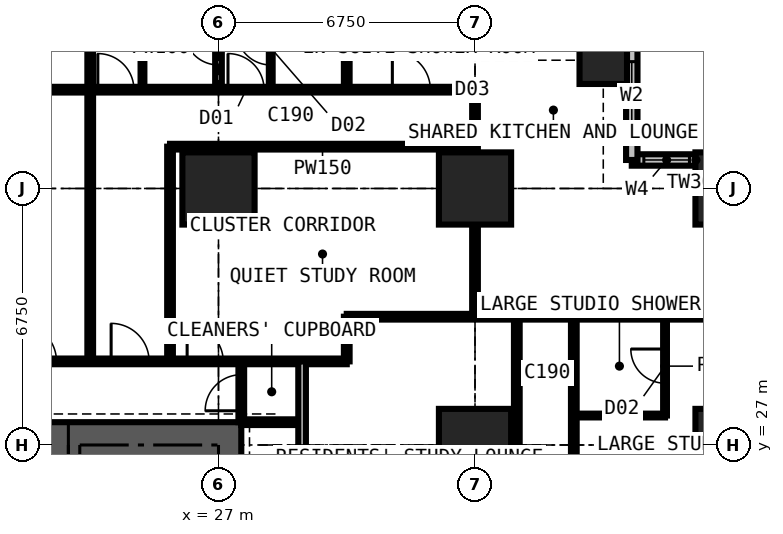
"""IFC4 building model, lengths in metres.
Left out: names, types, materials, properties, quantities, classifications, styles, units other than length and angle.
Written with IfcOpenShell. Run it as: python <this file> out.ifc"""

import sys

from ifc_helpers import new_model, si_unit, direction, frame, frame_2d, origin, origin_2d, place, context, subcontext, project, spatial, rectangle, extrude, element, fill, save


model = new_model("IFC4")
c1 = context("Model", 3, precision=1e-05, world=origin(), true_north=direction((0.0, 1.0)))
c2 = subcontext(c1, "Body", "Model", "MODEL_VIEW")
j1 = project(units=[si_unit("LENGTHUNIT", "METRE"), si_unit("PLANEANGLEUNIT", "RADIAN")], contexts=[c1])
p1 = place(None, origin())
s1 = spatial("IfcSite", under=j1, at=p1, CompositionType="ELEMENT")
p2 = place(p1, origin())
s2 = spatial("IfcBuilding", under=s1, at=p2, CompositionType="ELEMENT")
p3 = place(p2, frame((0.0, 0.0, 21.6)))
s3 = spatial("IfcBuildingStorey", under=s2, at=p3, CompositionType="ELEMENT", Elevation=21.6)
for number, where, z_axis, x_axis in (
    (1, (27.0, 33.75, 0.0), (0.0, 0.0, 1.0), (1.0, 0.0, 0.0)),
    (2, (33.75, 27.0, 0.0), (0.0, 0.0, 1.0), (1.0, 0.0, 0.0)),
    (3, (33.75, 33.75, 0.0), (0.0, 0.0, 1.0), (1.0, 0.0, 0.0)),
):
    element("IfcColumn", number, at=place(p3, frame(where, z_axis=z_axis, x_axis=x_axis)), inside=s3, PredefinedType="COLUMN", context=c2, shape_type="SweptSolid", body=[
        extrude(rectangle(XDim=1.9, YDim=1.9, at=origin_2d()), origin(), (0.0, 0.0, 1.0), 3.6),
    ])
p4 = place(p3, frame((37.125, 37.125, 0.0), z_axis=(0.0, 0.0, 1.0), x_axis=(1.0, 0.0, 0.0)))
e4 = element("IfcColumn", 4, at=p4, inside=s3, PredefinedType="COLUMN", context=c2, shape_type="SweptSolid", body=[
    extrude(rectangle(XDim=1.25, YDim=1.25, at=origin_2d()), origin(), (0.0, 0.0, 1.0), 3.6),
])
for number, where, z_axis, x_axis in (
    (5, (40.5, 27.0, 0.0), (0.0, 0.0, 1.0), (1.0, 0.0, 0.0)),
    (6, (40.5, 33.75, 0.0), (0.0, 0.0, 1.0), (1.0, 0.0, 0.0)),
):
    element("IfcColumn", number, at=place(p3, frame(where, z_axis=z_axis, x_axis=x_axis)), inside=s3, PredefinedType="COLUMN", context=c2, shape_type="SweptSolid", body=[
        extrude(rectangle(XDim=1.9, YDim=1.9, at=origin_2d()), origin(), (0.0, 0.0, 1.0), 3.6),
    ])
p5 = place(p3, frame((27.6, 27.0, 0.0), z_axis=(0.0, 0.0, 1.0), x_axis=(-1.0, 0.0, 0.0)))
e7 = element("IfcWall", 7, at=p5, inside=s3, PredefinedType="SHEAR", context=c2, shape_type="SweptSolid", body=[
    extrude(rectangle(XDim=14.7, YDim=1.2, at=frame_2d((7.35, 0.0))), origin(), (0.0, 0.0, 1.0), 3.6),
])
p6 = place(p5, frame((4.55, 0.0, 0.0)))
e8 = element("IfcOpeningElement", 8, at=p6, cuts=e7, PredefinedType="OPENING", context=c2, shape_type="SweptSolid", body=[
    extrude(rectangle(XDim=0.9, YDim=2.2, at=frame_2d((0.45, 1.1))), frame((0.0, 0.61, 0.0), z_axis=(0.0, -1.0, 0.0), x_axis=(1.0, 0.0, 0.0)), (0.0, 0.0, 1.0), 1.22),
])
p7 = place(p5, frame((7.525, 0.0, 0.0)))
e9 = element("IfcOpeningElement", 9, at=p7, cuts=e7, PredefinedType="OPENING", context=c2, shape_type="SweptSolid", body=[
    extrude(rectangle(XDim=1.0, YDim=2.2, at=frame_2d((0.5, 1.1))), frame((0.0, 0.61, 0.0), z_axis=(0.0, -1.0, 0.0), x_axis=(1.0, 0.0, 0.0)), (0.0, 0.0, 1.0), 1.22),
])
p8 = place(p3, frame((41.25, 34.5, 0.0), z_axis=(0.0, 0.0, 1.0), x_axis=(-1.0, 0.0, 0.0)))
e10 = element("IfcWall", 10, at=p8, inside=s3, PredefinedType="SOLIDWALL", context=c2, shape_type="SweptSolid", body=[
    extrude(rectangle(XDim=3.375, YDim=0.3, at=frame_2d((1.688, 0.0))), origin(), (0.0, 0.0, 1.0), 3.375),
])
p9 = place(p8, frame((1.857, 0.0, 0.9)))
e11 = element("IfcOpeningElement", 11, at=p9, cuts=e10, PredefinedType="OPENING", context=c2, shape_type="SweptSolid", body=[
    extrude(rectangle(XDim=1.2, YDim=1.8, at=frame_2d((0.6, 0.9))), frame((0.0, 0.16, 0.0), z_axis=(0.0, -1.0, 0.0), x_axis=(1.0, 0.0, 0.0)), (0.0, 0.0, 1.0), 0.32),
])
p10 = place(p3, frame((37.875, 34.5, 0.0), z_axis=(0.0, 0.0, 1.0), x_axis=(0.0, 1.0, 0.0)))
e12 = element("IfcWall", 12, at=p10, inside=s3, PredefinedType="SOLIDWALL", context=c2, shape_type="SweptSolid", body=[
    extrude(rectangle(XDim=3.375, YDim=0.3, at=frame_2d((1.688, 0.0))), origin(), (0.0, 0.0, 1.0), 3.375),
])
p11 = place(p10, frame((0.788, 0.0, 0.6)))
e13 = element("IfcOpeningElement", 13, at=p11, cuts=e12, PredefinedType="OPENING", context=c2, shape_type="SweptSolid", body=[
    extrude(rectangle(XDim=1.8, YDim=2.1, at=frame_2d((0.9, 1.05))), frame((0.0, 0.16, 0.0), z_axis=(0.0, -1.0, 0.0), x_axis=(1.0, 0.0, 0.0)), (0.0, 0.0, 1.0), 0.32),
])
p12 = place(p3, frame((10.125, 36.35, 0.0), z_axis=(0.0, 0.0, 1.0), x_axis=(1.0, 0.0, 0.0)))
e14 = element("IfcWall", 14, at=p12, inside=s3, PredefinedType="PARTITIONING", context=c2, shape_type="SweptSolid", body=[
    extrude(rectangle(XDim=23.625, YDim=0.15, at=frame_2d((11.812, 0.0))), origin(), (0.0, 0.0, 1.0), 3.375),
])
p13 = place(p12, frame((21.45, 0.0, 0.0)))
e15 = element("IfcOpeningElement", 15, at=p13, cuts=e14, PredefinedType="OPENING", context=c2, shape_type="SweptSolid", body=[
    extrude(rectangle(XDim=1.0, YDim=2.2, at=frame_2d((0.5, 1.1))), frame((0.0, 0.085, 0.0), z_axis=(0.0, -1.0, 0.0), x_axis=(1.0, 0.0, 0.0)), (0.0, 0.0, 1.0), 0.17),
])
p14 = place(p12, frame((17.125, 0.0, 0.0)))
e16 = element("IfcOpeningElement", 16, at=p14, cuts=e14, PredefinedType="OPENING", context=c2, shape_type="SweptSolid", body=[
    extrude(rectangle(XDim=0.95, YDim=2.2, at=frame_2d((0.475, 1.1))), frame((0.0, 0.085, 0.0), z_axis=(0.0, -1.0, 0.0), x_axis=(1.0, 0.0, 0.0)), (0.0, 0.0, 1.0), 0.17),
])
p15 = place(p12, frame((13.7, 0.0, 0.0)))
e17 = element("IfcOpeningElement", 17, at=p15, cuts=e14, PredefinedType="OPENING", context=c2, shape_type="SweptSolid", body=[
    extrude(rectangle(XDim=0.95, YDim=2.2, at=frame_2d((0.475, 1.1))), frame((0.0, 0.085, 0.0), z_axis=(0.0, -1.0, 0.0), x_axis=(1.0, 0.0, 0.0)), (0.0, 0.0, 1.0), 0.17),
])
p16 = place(p12, frame((4.2, 0.0, 0.0)))
e18 = element("IfcOpeningElement", 18, at=p16, cuts=e14, PredefinedType="OPENING", context=c2, shape_type="SweptSolid", body=[
    extrude(rectangle(XDim=0.95, YDim=2.2, at=frame_2d((0.475, 1.1))), frame((0.0, 0.085, 0.0), z_axis=(0.0, -1.0, 0.0), x_axis=(1.0, 0.0, 0.0)), (0.0, 0.0, 1.0), 0.17),
])
p17 = place(p12, frame((10.95, 0.0, 0.0)))
e19 = element("IfcOpeningElement", 19, at=p17, cuts=e14, PredefinedType="OPENING", context=c2, shape_type="SweptSolid", body=[
    extrude(rectangle(XDim=0.95, YDim=2.2, at=frame_2d((0.475, 1.1))), frame((0.0, 0.085, 0.0), z_axis=(0.0, -1.0, 0.0), x_axis=(1.0, 0.0, 0.0)), (0.0, 0.0, 1.0), 0.17),
])
p18 = place(p3, frame((11.3, 29.2, 0.0), z_axis=(0.0, 0.0, 1.0), x_axis=(1.0, 0.0, 0.0)))
e20 = element("IfcWall", 20, at=p18, inside=s3, PredefinedType="PARTITIONING", context=c2, shape_type="SweptSolid", body=[
    extrude(rectangle(XDim=19.075, YDim=0.15, at=frame_2d((9.538, 0.0))), origin(), (0.0, 0.0, 1.0), 3.375),
])
p19 = place(p18, frame((12.875, 0.0, 0.0)))
e21 = element("IfcOpeningElement", 21, at=p19, cuts=e20, PredefinedType="OPENING", context=c2, shape_type="SweptSolid", body=[
    extrude(rectangle(XDim=1.0, YDim=2.2, at=frame_2d((0.5, 1.1))), frame((0.0, 0.085, 0.0), z_axis=(0.0, -1.0, 0.0), x_axis=(1.0, 0.0, 0.0)), (0.0, 0.0, 1.0), 0.17),
])
p20 = place(p18, frame((10.438, 0.0, 0.0)))
e22 = element("IfcOpeningElement", 22, at=p20, cuts=e20, PredefinedType="OPENING", context=c2, shape_type="SweptSolid", body=[
    extrude(rectangle(XDim=1.0, YDim=2.2, at=frame_2d((0.5, 1.1))), frame((0.0, 0.085, 0.0), z_axis=(0.0, -1.0, 0.0), x_axis=(1.0, 0.0, 0.0)), (0.0, 0.0, 1.0), 0.17),
])
p21 = place(p18, frame((14.875, 0.0, 0.0)))
e23 = element("IfcOpeningElement", 23, at=p21, cuts=e20, PredefinedType="OPENING", context=c2, shape_type="SweptSolid", body=[
    extrude(rectangle(XDim=0.95, YDim=2.2, at=frame_2d((0.475, 1.1))), frame((0.0, 0.085, 0.0), z_axis=(0.0, -1.0, 0.0), x_axis=(1.0, 0.0, 0.0)), (0.0, 0.0, 1.0), 0.17),
])
p22 = place(p3, frame((23.625, 29.2, 0.0), z_axis=(0.0, 0.0, 1.0), x_axis=(0.0, 1.0, 0.0)))
e24 = element("IfcWall", 24, at=p22, inside=s3, PredefinedType="PARTITIONING", context=c2, shape_type="SweptSolid", body=[
    extrude(rectangle(XDim=12.034, YDim=0.15, at=frame_2d((6.017, 0.0))), origin(), (0.0, 0.0, 1.0), 3.375),
])
p23 = place(p3, frame((25.0, 36.35, 0.0), z_axis=(0.0, 0.0, 1.0), x_axis=(0.0, 1.0, 0.0)))
e25 = element("IfcWall", 25, at=p23, inside=s3, PredefinedType="PARTITIONING", context=c2, shape_type="SweptSolid", body=[
    extrude(rectangle(XDim=2.2, YDim=0.1, at=frame_2d((1.1, 0.0))), origin(), (0.0, 0.0, 1.0), 3.375),
])
p24 = place(p3, frame((25.725, 29.2, 0.0), z_axis=(0.0, 0.0, 1.0), x_axis=(0.0, 1.0, 0.0)))
e26 = element("IfcWall", 26, at=p24, inside=s3, PredefinedType="PARTITIONING", context=c2, shape_type="SweptSolid", body=[
    extrude(rectangle(XDim=5.65, YDim=0.15, at=frame_2d((2.825, 0.0))), origin(), (0.0, 0.0, 1.0), 3.375),
])
p25 = place(p3, frame((25.725, 34.85, 0.0), z_axis=(0.0, 0.0, 1.0), x_axis=(1.0, 0.0, 0.0)))
e27 = element("IfcWall", 27, at=p25, inside=s3, PredefinedType="PARTITIONING", context=c2, shape_type="SweptSolid", body=[
    extrude(rectangle(XDim=8.025, YDim=0.15, at=frame_2d((4.012, 0.0))), origin(), (0.0, 0.0, 1.0), 3.375),
])
p26 = place(p3, frame((27.0, 36.35, 0.0), z_axis=(0.0, 0.0, 1.0), x_axis=(0.0, 1.0, 0.0)))
e28 = element("IfcWall", 28, at=p26, inside=s3, PredefinedType="PARTITIONING", context=c2, shape_type="SweptSolid", body=[
    extrude(rectangle(XDim=4.884, YDim=0.175, at=frame_2d((2.442, 0.0))), origin(), (0.0, 0.0, 1.0), 2.877),
])
p27 = place(p26, frame((0.65, 0.0, 0.0)))
e29 = element("IfcOpeningElement", 29, at=p27, cuts=e28, PredefinedType="OPENING", context=c2, shape_type="SweptSolid", body=[
    extrude(rectangle(XDim=0.9, YDim=2.2, at=frame_2d((0.45, 1.1))), frame((0.0, 0.097, 0.0), z_axis=(0.0, -1.0, 0.0), x_axis=(1.0, 0.0, 0.0)), (0.0, 0.0, 1.0), 0.195),
])
p28 = place(p3, frame((27.6, 27.6, 0.0), z_axis=(0.0, 0.0, 1.0), x_axis=(0.0, 1.0, 0.0)))
e30 = element("IfcWall", 30, at=p28, inside=s3, PredefinedType="PARTITIONING", context=c2, shape_type="SweptSolid", body=[
    extrude(rectangle(XDim=1.6, YDim=0.15, at=frame_2d((0.8, 0.0))), origin(), (0.0, 0.0, 1.0), 3.375),
])
p29 = place(p28, frame((0.3, 0.0, 0.0)))
e31 = element("IfcOpeningElement", 31, at=p29, cuts=e30, PredefinedType="OPENING", context=c2, shape_type="SweptSolid", body=[
    extrude(rectangle(XDim=0.95, YDim=2.2, at=frame_2d((0.475, 1.1))), frame((0.0, 0.085, 0.0), z_axis=(0.0, -1.0, 0.0), x_axis=(1.0, 0.0, 0.0)), (0.0, 0.0, 1.0), 0.17),
])
p30 = place(p3, frame((27.6, 27.6, 0.0), z_axis=(0.0, 0.0, 1.0), x_axis=(1.0, 0.0, 0.0)))
e32 = element("IfcWall", 32, at=p30, inside=s3, PredefinedType="PARTITIONING", context=c2, shape_type="SweptSolid", body=[
    extrude(rectangle(XDim=1.6, YDim=0.15, at=frame_2d((0.8, 0.0))), origin(), (0.0, 0.0, 1.0), 2.877),
])
p31 = place(p3, frame((28.375, 36.35, 0.0), z_axis=(0.0, 0.0, 1.0), x_axis=(0.0, 1.0, 0.0)))
e33 = element("IfcWall", 33, at=p31, inside=s3, PredefinedType="PARTITIONING", context=c2, shape_type="SweptSolid", body=[
    extrude(rectangle(XDim=2.2, YDim=0.1, at=frame_2d((1.1, 0.0))), origin(), (0.0, 0.0, 1.0), 3.375),
])
p32 = place(p31, frame((0.65, 0.0, 0.0)))
e34 = element("IfcOpeningElement", 34, at=p32, cuts=e33, PredefinedType="OPENING", context=c2, shape_type="SweptSolid", body=[
    extrude(rectangle(XDim=0.9, YDim=2.2, at=frame_2d((0.45, 1.1))), frame((0.0, 0.06, 0.0), z_axis=(0.0, -1.0, 0.0), x_axis=(1.0, 0.0, 0.0)), (0.0, 0.0, 1.0), 0.12),
])
p33 = place(p3, frame((29.2, 11.3, 0.0), z_axis=(0.0, 0.0, 1.0), x_axis=(0.0, 1.0, 0.0)))
e35 = element("IfcWall", 35, at=p33, inside=s3, PredefinedType="PARTITIONING", context=c2, shape_type="SweptSolid", body=[
    extrude(rectangle(XDim=17.9, YDim=0.2, at=frame_2d((8.95, 0.0))), origin(), (0.0, 0.0, 1.0), 3.375),
])
p34 = place(p33, frame((8.35, 0.0, 0.0)))
e36 = element("IfcOpeningElement", 36, at=p34, cuts=e35, PredefinedType="OPENING", context=c2, shape_type="SweptSolid", body=[
    extrude(rectangle(XDim=1.2, YDim=2.2, at=frame_2d((0.6, 1.1))), frame((0.0, 0.11, 0.0), z_axis=(0.0, -1.0, 0.0), x_axis=(1.0, 0.0, 0.0)), (0.0, 0.0, 1.0), 0.22),
])
p35 = place(p3, frame((30.375, 29.2, 0.0), z_axis=(0.0, 0.0, 1.0), x_axis=(0.0, 1.0, 0.0)))
e37 = element("IfcWall", 37, at=p35, inside=s3, PredefinedType="PARTITIONING", context=c2, shape_type="SweptSolid", body=[
    extrude(rectangle(XDim=1.175, YDim=0.15, at=frame_2d((0.587, 0.0))), origin(), (0.0, 0.0, 1.0), 3.375),
])
p36 = place(p3, frame((30.375, 30.375, 0.0), z_axis=(0.0, 0.0, 1.0), x_axis=(1.0, 0.0, 0.0)))
e38 = element("IfcWall", 38, at=p36, inside=s3, PredefinedType="PARTITIONING", context=c2, shape_type="SweptSolid", body=[
    extrude(rectangle(XDim=10.859, YDim=0.15, at=frame_2d((5.429, 0.0))), origin(), (0.0, 0.0, 1.0), 3.375),
])
p37 = place(p3, frame((30.375, 36.35, 0.0), z_axis=(0.0, 0.0, 1.0), x_axis=(0.0, 1.0, 0.0)))
e39 = element("IfcWall", 39, at=p37, inside=s3, PredefinedType="PARTITIONING", context=c2, shape_type="SweptSolid", body=[
    extrude(rectangle(XDim=4.884, YDim=0.15, at=frame_2d((2.442, 0.0))), origin(), (0.0, 0.0, 1.0), 3.375),
])
p38 = place(p3, frame((33.75, 30.375, 0.0), z_axis=(0.0, 0.0, 1.0), x_axis=(0.0, 1.0, 0.0)))
e40 = element("IfcWall", 40, at=p38, inside=s3, PredefinedType="PARTITIONING", context=c2, shape_type="SweptSolid", body=[
    extrude(rectangle(XDim=5.975, YDim=0.15, at=frame_2d((2.988, 0.0))), origin(), (0.0, 0.0, 1.0), 2.877),
])
p39 = place(p3, frame((34.85, 12.55, 0.0), z_axis=(0.0, 0.0, 1.0), x_axis=(0.0, 1.0, 0.0)))
e41 = element("IfcWall", 41, at=p39, inside=s3, PredefinedType="PARTITIONING", context=c2, shape_type="SweptSolid", body=[
    extrude(rectangle(XDim=17.825, YDim=0.15, at=frame_2d((8.913, 0.0))), origin(), (0.0, 0.0, 1.0), 3.375),
])
p40 = place(p39, frame((8.65, 0.0, 0.0)))
e42 = element("IfcOpeningElement", 42, at=p40, cuts=e41, PredefinedType="OPENING", context=c2, shape_type="SweptSolid", body=[
    extrude(rectangle(XDim=0.95, YDim=2.2, at=frame_2d((0.475, 1.1))), frame((0.0, 0.085, 0.0), z_axis=(0.0, -1.0, 0.0), x_axis=(1.0, 0.0, 0.0)), (0.0, 0.0, 1.0), 0.17),
])
p41 = place(p3, frame((36.35, 6.75, 0.0), z_axis=(0.0, 0.0, 1.0), x_axis=(0.0, 1.0, 0.0)))
e43 = element("IfcWall", 43, at=p41, inside=s3, PredefinedType="PARTITIONING", context=c2, shape_type="SweptSolid", body=[
    extrude(rectangle(XDim=23.625, YDim=0.15, at=frame_2d((11.812, 0.0))), origin(), (0.0, 0.0, 1.0), 3.375),
])
p42 = place(p41, frame((0.2, 0.0, 0.0)))
e44 = element("IfcOpeningElement", 44, at=p42, cuts=e43, PredefinedType="OPENING", context=c2, shape_type="SweptSolid", body=[
    extrude(rectangle(XDim=0.95, YDim=2.2, at=frame_2d((0.475, 1.1))), frame((0.0, 0.085, 0.0), z_axis=(0.0, -1.0, 0.0), x_axis=(1.0, 0.0, 0.0)), (0.0, 0.0, 1.0), 0.17),
])
p43 = place(p41, frame((18.475, 0.0, 0.0)))
e45 = element("IfcOpeningElement", 45, at=p43, cuts=e43, PredefinedType="OPENING", context=c2, shape_type="SweptSolid", body=[
    extrude(rectangle(XDim=0.95, YDim=2.2, at=frame_2d((0.475, 1.1))), frame((0.0, 0.085, 0.0), z_axis=(0.0, -1.0, 0.0), x_axis=(1.0, 0.0, 0.0)), (0.0, 0.0, 1.0), 0.17),
])
p44 = place(p41, frame((11.725, 0.0, 0.0)))
e46 = element("IfcOpeningElement", 46, at=p44, cuts=e43, PredefinedType="OPENING", context=c2, shape_type="SweptSolid", body=[
    extrude(rectangle(XDim=0.95, YDim=2.2, at=frame_2d((0.475, 1.1))), frame((0.0, 0.085, 0.0), z_axis=(0.0, -1.0, 0.0), x_axis=(1.0, 0.0, 0.0)), (0.0, 0.0, 1.0), 0.17),
])
p45 = place(p41, frame((4.975, 0.0, 0.0)))
e47 = element("IfcOpeningElement", 47, at=p45, cuts=e43, PredefinedType="OPENING", context=c2, shape_type="SweptSolid", body=[
    extrude(rectangle(XDim=0.95, YDim=2.2, at=frame_2d((0.475, 1.1))), frame((0.0, 0.085, 0.0), z_axis=(0.0, -1.0, 0.0), x_axis=(1.0, 0.0, 0.0)), (0.0, 0.0, 1.0), 0.17),
])
p46 = place(p3, frame((36.35, 27.775, 0.0), z_axis=(0.0, 0.0, 1.0), x_axis=(1.0, 0.0, 0.0)))
e48 = element("IfcWall", 48, at=p46, inside=s3, PredefinedType="PARTITIONING", context=c2, shape_type="SweptSolid", body=[
    extrude(rectangle(XDim=2.4, YDim=0.1, at=frame_2d((1.2, 0.0))), origin(), (0.0, 0.0, 1.0), 3.375),
])
p47 = place(p3, frame((38.75, 27.775, 0.0), z_axis=(0.0, 0.0, 1.0), x_axis=(0.0, 1.0, 0.0)))
e49 = element("IfcWall", 49, at=p47, inside=s3, PredefinedType="PARTITIONING", context=c2, shape_type="SweptSolid", body=[
    extrude(rectangle(XDim=2.6, YDim=0.1, at=frame_2d((1.3, 0.0))), origin(), (0.0, 0.0, 1.0), 3.375),
])
p48 = place(p47, frame((0.85, 0.0, 0.0)))
e50 = element("IfcOpeningElement", 50, at=p48, cuts=e49, PredefinedType="OPENING", context=c2, shape_type="SweptSolid", body=[
    extrude(rectangle(XDim=0.9, YDim=2.2, at=frame_2d((0.45, 1.1))), frame((0.0, 0.06, 0.0), z_axis=(0.0, -1.0, 0.0), x_axis=(1.0, 0.0, 0.0)), (0.0, 0.0, 1.0), 0.12),
])
p49 = place(p9, origin())
e51 = element("IfcWindow", 51, at=p49, inside=s3, PartitioningType="SINGLE_PANEL", PredefinedType="WINDOW", context=c2, shape_type="SweptSolid", body=[
    extrude(rectangle(XDim=1.2, YDim=1.8, at=frame_2d((0.6, 0.9))), frame((0.0, 0.03, 0.0), z_axis=(0.0, -1.0, 0.0), x_axis=(1.0, 0.0, 0.0)), (0.0, 0.0, 1.0), 0.06),
])
fill(e11, e51)
p50 = place(p11, origin())
e52 = element("IfcWindow", 52, at=p50, inside=s3, PartitioningType="SINGLE_PANEL", PredefinedType="WINDOW", context=c2, shape_type="SweptSolid", body=[
    extrude(rectangle(XDim=1.8, YDim=2.1, at=frame_2d((0.9, 1.05))), frame((0.0, 0.03, 0.0), z_axis=(0.0, -1.0, 0.0), x_axis=(1.0, 0.0, 0.0)), (0.0, 0.0, 1.0), 0.06),
])
fill(e13, e52)
p51 = place(p6, origin())
e53 = element("IfcDoor", 53, at=p51, inside=s3, OperationType="SINGLE_SWING_LEFT", PredefinedType="DOOR", context=c2, shape_type="SweptSolid", body=[
    extrude(rectangle(XDim=0.9, YDim=2.2, at=frame_2d((0.45, 1.1))), frame((0.0, 0.4, 0.0), z_axis=(0.0, -1.0, 0.0), x_axis=(1.0, 0.0, 0.0)), (0.0, 0.0, 1.0), 0.8),
])
fill(e8, e53)
p52 = place(p29, origin())
e54 = element("IfcDoor", 54, at=p52, inside=s3, OperationType="SINGLE_SWING_LEFT", PredefinedType="DOOR", context=c2, shape_type="SweptSolid", body=[
    extrude(rectangle(XDim=0.95, YDim=2.2, at=frame_2d((0.475, 1.1))), frame((0.0, 0.025, 0.0), z_axis=(0.0, -1.0, 0.0), x_axis=(1.0, 0.0, 0.0)), (0.0, 0.0, 1.0), 0.05),
])
fill(e31, e54)
p53 = place(p48, origin())
e55 = element("IfcDoor", 55, at=p53, inside=s3, OperationType="SINGLE_SWING_RIGHT", PredefinedType="DOOR", context=c2, shape_type="SweptSolid", body=[
    extrude(rectangle(XDim=0.9, YDim=2.2, at=frame_2d((0.45, 1.1))), frame((0.0, 0.025, 0.0), z_axis=(0.0, -1.0, 0.0), x_axis=(1.0, 0.0, 0.0)), (0.0, 0.0, 1.0), 0.05),
])
fill(e50, e55)
p54 = place(p13, origin())
e56 = element("IfcDoor", 56, at=p54, inside=s3, OperationType="SINGLE_SWING_LEFT", PredefinedType="DOOR", context=c2, shape_type="SweptSolid", body=[
    extrude(rectangle(XDim=1.0, YDim=2.2, at=frame_2d((0.5, 1.1))), frame((0.0, 0.025, 0.0), z_axis=(0.0, -1.0, 0.0), x_axis=(1.0, 0.0, 0.0)), (0.0, 0.0, 1.0), 0.05),
])
fill(e15, e56)
p55 = place(p14, origin())
e57 = element("IfcDoor", 57, at=p55, inside=s3, OperationType="SINGLE_SWING_LEFT", PredefinedType="DOOR", context=c2, shape_type="SweptSolid", body=[
    extrude(rectangle(XDim=0.95, YDim=2.2, at=frame_2d((0.475, 1.1))), frame((0.0, 0.025, 0.0), z_axis=(0.0, -1.0, 0.0), x_axis=(1.0, 0.0, 0.0)), (0.0, 0.0, 1.0), 0.05),
])
fill(e16, e57)
p56 = place(p32, origin())
e58 = element("IfcDoor", 58, at=p56, inside=s3, OperationType="SINGLE_SWING_RIGHT", PredefinedType="DOOR", context=c2, shape_type="SweptSolid", body=[
    extrude(rectangle(XDim=0.9, YDim=2.2, at=frame_2d((0.45, 1.1))), frame((0.0, 0.025, 0.0), z_axis=(0.0, -1.0, 0.0), x_axis=(1.0, 0.0, 0.0)), (0.0, 0.0, 1.0), 0.05),
])
fill(e34, e58)
p57 = place(p15, origin())
e59 = element("IfcDoor", 59, at=p57, inside=s3, OperationType="SINGLE_SWING_LEFT", PredefinedType="DOOR", context=c2, shape_type="SweptSolid", body=[
    extrude(rectangle(XDim=0.95, YDim=2.2, at=frame_2d((0.475, 1.1))), frame((0.0, 0.025, 0.0), z_axis=(0.0, -1.0, 0.0), x_axis=(1.0, 0.0, 0.0)), (0.0, 0.0, 1.0), 0.05),
])
fill(e17, e59)
p58 = place(p27, origin())
e60 = element("IfcDoor", 60, at=p58, inside=s3, OperationType="SINGLE_SWING_RIGHT", PredefinedType="DOOR", context=c2, shape_type="SweptSolid", body=[
    extrude(rectangle(XDim=0.9, YDim=2.2, at=frame_2d((0.45, 1.1))), frame((0.0, 0.025, 0.0), z_axis=(0.0, -1.0, 0.0), x_axis=(1.0, 0.0, 0.0)), (0.0, 0.0, 1.0), 0.05),
])
fill(e29, e60)
p59 = place(p19, origin())
e61 = element("IfcDoor", 61, at=p59, inside=s3, OperationType="SINGLE_SWING_LEFT", PredefinedType="DOOR", context=c2, shape_type="SweptSolid", body=[
    extrude(rectangle(XDim=1.0, YDim=2.2, at=frame_2d((0.5, 1.1))), frame((0.0, 0.025, 0.0), z_axis=(0.0, -1.0, 0.0), x_axis=(1.0, 0.0, 0.0)), (0.0, 0.0, 1.0), 0.05),
])
fill(e21, e61)
p60 = place(p20, origin())
e62 = element("IfcDoor", 62, at=p60, inside=s3, OperationType="SINGLE_SWING_LEFT", PredefinedType="DOOR", context=c2, shape_type="SweptSolid", body=[
    extrude(rectangle(XDim=1.0, YDim=2.2, at=frame_2d((0.5, 1.1))), frame((0.0, 0.025, 0.0), z_axis=(0.0, -1.0, 0.0), x_axis=(1.0, 0.0, 0.0)), (0.0, 0.0, 1.0), 0.05),
])
fill(e22, e62)
p61 = place(p21, origin())
e63 = element("IfcDoor", 63, at=p61, inside=s3, OperationType="SINGLE_SWING_LEFT", PredefinedType="DOOR", context=c2, shape_type="SweptSolid", body=[
    extrude(rectangle(XDim=0.95, YDim=2.2, at=frame_2d((0.475, 1.1))), frame((0.0, 0.025, 0.0), z_axis=(0.0, -1.0, 0.0), x_axis=(1.0, 0.0, 0.0)), (0.0, 0.0, 1.0), 0.05),
])
fill(e23, e63)
save(model, sys.argv[1])
